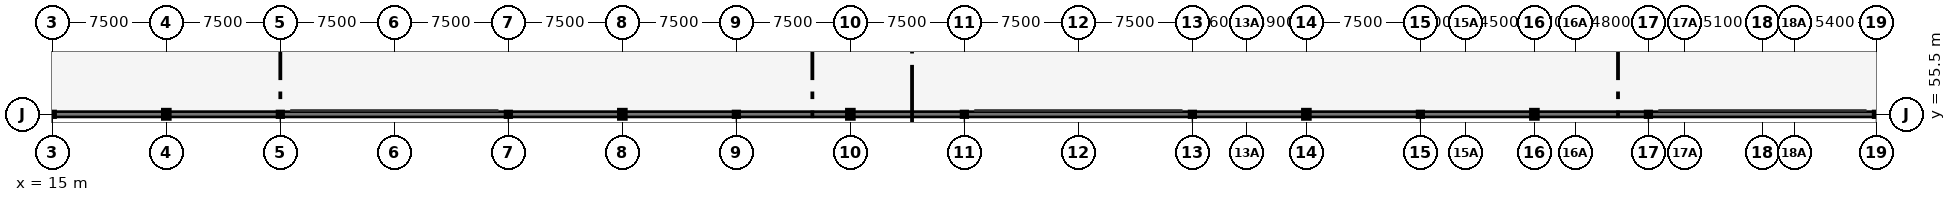
"""IFC4 building model, lengths in metres.
Left out: names, types, materials, properties, quantities, classifications, styles, units other than length and angle.
Written with IfcOpenShell. Run it as: python <this file> out.ifc"""

import sys

from ifc_helpers import new_model, si_unit, direction, frame, frame_2d, origin, origin_2d, place, context, subcontext, project, spatial, polyline, rectangle, i_section, outline, extrude, element, fill, save


model = new_model("IFC4")
c1 = context("Model", 3, precision=1e-05, world=origin(), true_north=direction((0.0, 1.0)))
c2 = subcontext(c1, "Body", "Model", "MODEL_VIEW")
j1 = project(units=[si_unit("LENGTHUNIT", "METRE"), si_unit("PLANEANGLEUNIT", "RADIAN")], contexts=[c1])
p1 = place(None, origin())
s1 = spatial("IfcSite", under=j1, at=p1, CompositionType="ELEMENT")
p2 = place(p1, origin())
s2 = spatial("IfcBuilding", under=s1, at=p2, CompositionType="ELEMENT")
p3 = place(p2, origin())
s3 = spatial("IfcBuildingStorey", under=s2, at=p3, CompositionType="ELEMENT", Elevation=0.0)
for number, where, z_axis, x_axis in (
    (1, (15.0, 55.5, 0.0), (0.0, 0.0, 1.0), (1.0, 0.0, 0.0)),
    (2, (30.0, 55.5, 0.0), (0.0, 0.0, 1.0), (1.0, 0.0, 0.0)),
    (3, (45.0, 55.5, 0.0), (0.0, 0.0, 1.0), (1.0, 0.0, 0.0)),
    (4, (60.0, 55.5, 0.0), (0.0, 0.0, 1.0), (1.0, 0.0, 0.0)),
    (5, (75.0, 55.5, 0.0), (0.0, 0.0, 1.0), (1.0, 0.0, 0.0)),
    (6, (90.0, 55.5, 0.0), (0.0, 0.0, 1.0), (1.0, 0.0, 0.0)),
    (7, (105.0, 55.5, 0.0), (0.0, 0.0, 1.0), (1.0, 0.0, 0.0)),
    (8, (120.0, 55.5, 0.0), (0.0, 0.0, 1.0), (1.0, 0.0, 0.0)),
    (9, (135.0, 55.5, 0.0), (0.0, 0.0, 1.0), (1.0, 0.0, 0.0)),
):
    element("IfcColumn", number, at=place(p3, frame(where, z_axis=z_axis, x_axis=x_axis)), inside=s3, PredefinedType="COLUMN", context=c2, shape_type="SweptSolid", body=[
        extrude(i_section(OverallWidth=0.256, OverallDepth=0.26, WebThickness=0.01, FlangeThickness=0.017, at=origin_2d()), origin(), (0.0, 0.0, 1.0), 7.6),
    ])
for number, where, z_axis, x_axis in (
    (10, (22.5, 55.5, 0.0), (0.0, 0.0, 1.0), (1.0, 0.0, 0.0)),
    (11, (52.5, 55.5, 0.0), (0.0, 0.0, 1.0), (1.0, 0.0, 0.0)),
    (12, (67.5, 55.5, 0.0), (0.0, 0.0, 1.0), (1.0, 0.0, 0.0)),
    (13, (97.5, 55.5, 0.0), (0.0, 0.0, 1.0), (1.0, 0.0, 0.0)),
    (14, (112.5, 55.5, 0.0), (0.0, 0.0, 1.0), (1.0, 0.0, 0.0)),
):
    element("IfcColumn", number, at=place(p3, frame(where, z_axis=z_axis, x_axis=x_axis)), inside=s3, PredefinedType="PILASTER", context=c2, shape_type="SweptSolid", body=[
        extrude(rectangle(XDim=0.35, YDim=0.5, at=origin_2d()), origin(), (0.0, 0.0, 1.0), 4.4),
    ])
p4 = place(p3, frame((7.5, 55.5, 0.0), z_axis=(0.0, 0.0, 1.0), x_axis=(1.0, 0.0, 0.0)))
e15 = element("IfcWall", 15, at=p4, inside=s3, PredefinedType="SOLIDWALL", context=c2, shape_type="SweptSolid", body=[
    extrude(rectangle(XDim=135.0, YDim=0.35, at=frame_2d((67.5, 0.0))), origin(), (0.0, 0.0, 1.0), 6.136),
])
p5 = place(p4, frame((3.2, 0.0, 3.4)))
e16 = element("IfcOpeningElement", 16, at=p5, cuts=e15, PredefinedType="OPENING", context=c2, shape_type="SweptSolid", body=[
    extrude(outline(polyline([(1.8, 0.9), (1.769, 1.133), (1.679, 1.35), (1.536, 1.536), (1.35, 1.679), (1.133, 1.769), (0.9, 1.8), (0.667, 1.769), (0.45, 1.679), (0.264, 1.536), (0.121, 1.35), (0.031, 1.133), (0.0, 0.9), (0.031, 0.667), (0.121, 0.45), (0.264, 0.264), (0.45, 0.121), (0.667, 0.031), (0.9, 0.0), (1.133, 0.031), (1.35, 0.121), (1.536, 0.264), (1.679, 0.45), (1.769, 0.667), (1.8, 0.9)])), frame((0.0, 0.185, 0.0), z_axis=(0.0, -1.0, 0.0), x_axis=(1.0, 0.0, 0.0)), (0.0, 0.0, 1.0), 0.37),
])
p6 = place(p4, frame((18.2, 0.0, 3.4)))
e17 = element("IfcOpeningElement", 17, at=p6, cuts=e15, PredefinedType="OPENING", context=c2, shape_type="SweptSolid", body=[
    extrude(outline(polyline([(2.1, 1.05), (2.064, 1.322), (1.959, 1.575), (1.792, 1.792), (1.575, 1.959), (1.322, 2.064), (1.05, 2.1), (0.778, 2.064), (0.525, 1.959), (0.308, 1.792), (0.141, 1.575), (0.036, 1.322), (0.0, 1.05), (0.036, 0.778), (0.141, 0.525), (0.308, 0.308), (0.525, 0.141), (0.778, 0.036), (1.05, 0.0), (1.322, 0.036), (1.575, 0.141), (1.792, 0.308), (1.959, 0.525), (2.064, 0.778), (2.1, 1.05)])), frame((0.0, 0.185, 0.0), z_axis=(0.0, -1.0, 0.0), x_axis=(1.0, 0.0, 0.0)), (0.0, 0.0, 1.0), 0.37),
])
p7 = place(p4, frame((33.2, 0.0, 3.4)))
e18 = element("IfcOpeningElement", 18, at=p7, cuts=e15, PredefinedType="OPENING", context=c2, shape_type="SweptSolid", body=[
    extrude(outline(polyline([(2.4, 1.2), (2.359, 1.51), (2.239, 1.8), (2.048, 2.048), (1.8, 2.239), (1.51, 2.359), (1.2, 2.4), (0.889, 2.359), (0.6, 2.239), (0.352, 2.048), (0.161, 1.8), (0.041, 1.51), (0.0, 1.2), (0.041, 0.889), (0.161, 0.6), (0.352, 0.352), (0.6, 0.161), (0.889, 0.041), (1.2, 0.0), (1.51, 0.041), (1.8, 0.161), (2.048, 0.352), (2.239, 0.6), (2.359, 0.889), (2.4, 1.2)])), frame((0.0, 0.185, 0.0), z_axis=(0.0, -1.0, 0.0), x_axis=(1.0, 0.0, 0.0)), (0.0, 0.0, 1.0), 0.37),
])
p8 = place(p4, frame((48.2, 0.0, 3.4)))
e19 = element("IfcOpeningElement", 19, at=p8, cuts=e15, PredefinedType="OPENING", context=c2, shape_type="SweptSolid", body=[
    extrude(outline(polyline([(1.8, 0.9), (1.769, 1.133), (1.679, 1.35), (1.536, 1.536), (1.35, 1.679), (1.133, 1.769), (0.9, 1.8), (0.667, 1.769), (0.45, 1.679), (0.264, 1.536), (0.121, 1.35), (0.031, 1.133), (0.0, 0.9), (0.031, 0.667), (0.121, 0.45), (0.264, 0.264), (0.45, 0.121), (0.667, 0.031), (0.9, 0.0), (1.133, 0.031), (1.35, 0.121), (1.536, 0.264), (1.679, 0.45), (1.769, 0.667), (1.8, 0.9)])), frame((0.0, 0.185, 0.0), z_axis=(0.0, -1.0, 0.0), x_axis=(1.0, 0.0, 0.0)), (0.0, 0.0, 1.0), 0.37),
])
p9 = place(p4, frame((63.2, 0.0, 3.4)))
e20 = element("IfcOpeningElement", 20, at=p9, cuts=e15, PredefinedType="OPENING", context=c2, shape_type="SweptSolid", body=[
    extrude(outline(polyline([(2.1, 1.05), (2.064, 1.322), (1.959, 1.575), (1.792, 1.792), (1.575, 1.959), (1.322, 2.064), (1.05, 2.1), (0.778, 2.064), (0.525, 1.959), (0.308, 1.792), (0.141, 1.575), (0.036, 1.322), (0.0, 1.05), (0.036, 0.778), (0.141, 0.525), (0.308, 0.308), (0.525, 0.141), (0.778, 0.036), (1.05, 0.0), (1.322, 0.036), (1.575, 0.141), (1.792, 0.308), (1.959, 0.525), (2.064, 0.778), (2.1, 1.05)])), frame((0.0, 0.185, 0.0), z_axis=(0.0, -1.0, 0.0), x_axis=(1.0, 0.0, 0.0)), (0.0, 0.0, 1.0), 0.37),
])
p10 = place(p4, frame((78.2, 0.0, 3.4)))
e21 = element("IfcOpeningElement", 21, at=p10, cuts=e15, PredefinedType="OPENING", context=c2, shape_type="SweptSolid", body=[
    extrude(outline(polyline([(2.4, 1.2), (2.359, 1.51), (2.239, 1.8), (2.048, 2.048), (1.8, 2.239), (1.51, 2.359), (1.2, 2.4), (0.889, 2.359), (0.6, 2.239), (0.352, 2.048), (0.161, 1.8), (0.041, 1.51), (0.0, 1.2), (0.041, 0.889), (0.161, 0.6), (0.352, 0.352), (0.6, 0.161), (0.889, 0.041), (1.2, 0.0), (1.51, 0.041), (1.8, 0.161), (2.048, 0.352), (2.239, 0.6), (2.359, 0.889), (2.4, 1.2)])), frame((0.0, 0.185, 0.0), z_axis=(0.0, -1.0, 0.0), x_axis=(1.0, 0.0, 0.0)), (0.0, 0.0, 1.0), 0.37),
])
p11 = place(p4, frame((93.2, 0.0, 3.4)))
e22 = element("IfcOpeningElement", 22, at=p11, cuts=e15, PredefinedType="OPENING", context=c2, shape_type="SweptSolid", body=[
    extrude(outline(polyline([(1.8, 0.9), (1.769, 1.133), (1.679, 1.35), (1.536, 1.536), (1.35, 1.679), (1.133, 1.769), (0.9, 1.8), (0.667, 1.769), (0.45, 1.679), (0.264, 1.536), (0.121, 1.35), (0.031, 1.133), (0.0, 0.9), (0.031, 0.667), (0.121, 0.45), (0.264, 0.264), (0.45, 0.121), (0.667, 0.031), (0.9, 0.0), (1.133, 0.031), (1.35, 0.121), (1.536, 0.264), (1.679, 0.45), (1.769, 0.667), (1.8, 0.9)])), frame((0.0, 0.185, 0.0), z_axis=(0.0, -1.0, 0.0), x_axis=(1.0, 0.0, 0.0)), (0.0, 0.0, 1.0), 0.37),
])
p12 = place(p4, frame((108.2, 0.0, 3.4)))
e23 = element("IfcOpeningElement", 23, at=p12, cuts=e15, PredefinedType="OPENING", context=c2, shape_type="SweptSolid", body=[
    extrude(outline(polyline([(2.1, 1.05), (2.064, 1.322), (1.959, 1.575), (1.792, 1.792), (1.575, 1.959), (1.322, 2.064), (1.05, 2.1), (0.778, 2.064), (0.525, 1.959), (0.308, 1.792), (0.141, 1.575), (0.036, 1.322), (0.0, 1.05), (0.036, 0.778), (0.141, 0.525), (0.308, 0.308), (0.525, 0.141), (0.778, 0.036), (1.05, 0.0), (1.322, 0.036), (1.575, 0.141), (1.792, 0.308), (1.959, 0.525), (2.064, 0.778), (2.1, 1.05)])), frame((0.0, 0.185, 0.0), z_axis=(0.0, -1.0, 0.0), x_axis=(1.0, 0.0, 0.0)), (0.0, 0.0, 1.0), 0.37),
])
p13 = place(p4, frame((123.2, 0.0, 3.4)))
e24 = element("IfcOpeningElement", 24, at=p13, cuts=e15, PredefinedType="OPENING", context=c2, shape_type="SweptSolid", body=[
    extrude(outline(polyline([(2.4, 1.2), (2.359, 1.51), (2.239, 1.8), (2.048, 2.048), (1.8, 2.239), (1.51, 2.359), (1.2, 2.4), (0.889, 2.359), (0.6, 2.239), (0.352, 2.048), (0.161, 1.8), (0.041, 1.51), (0.0, 1.2), (0.041, 0.889), (0.161, 0.6), (0.352, 0.352), (0.6, 0.161), (0.889, 0.041), (1.2, 0.0), (1.51, 0.041), (1.8, 0.161), (2.048, 0.352), (2.239, 0.6), (2.359, 0.889), (2.4, 1.2)])), frame((0.0, 0.185, 0.0), z_axis=(0.0, -1.0, 0.0), x_axis=(1.0, 0.0, 0.0)), (0.0, 0.0, 1.0), 0.37),
])
p14 = place(p4, frame((9.5, 0.0, 0.0)))
e25 = element("IfcOpeningElement", 25, at=p14, cuts=e15, PredefinedType="OPENING", context=c2, shape_type="SweptSolid", body=[
    extrude(rectangle(XDim=2.0, YDim=2.35, at=frame_2d((1.0, 1.175))), frame((0.0, 0.185, 0.0), z_axis=(0.0, -1.0, 0.0), x_axis=(1.0, 0.0, 0.0)), (0.0, 0.0, 1.0), 0.37),
])
p15 = place(p4, frame((24.5, 0.0, 0.0)))
e26 = element("IfcOpeningElement", 26, at=p15, cuts=e15, PredefinedType="OPENING", context=c2, shape_type="SweptSolid", body=[
    extrude(rectangle(XDim=2.0, YDim=2.35, at=frame_2d((1.0, 1.175))), frame((0.0, 0.185, 0.0), z_axis=(0.0, -1.0, 0.0), x_axis=(1.0, 0.0, 0.0)), (0.0, 0.0, 1.0), 0.37),
])
p16 = place(p4, frame((39.5, 0.0, 0.0)))
e27 = element("IfcOpeningElement", 27, at=p16, cuts=e15, PredefinedType="OPENING", context=c2, shape_type="SweptSolid", body=[
    extrude(rectangle(XDim=2.0, YDim=2.35, at=frame_2d((1.0, 1.175))), frame((0.0, 0.185, 0.0), z_axis=(0.0, -1.0, 0.0), x_axis=(1.0, 0.0, 0.0)), (0.0, 0.0, 1.0), 0.37),
])
p17 = place(p4, frame((54.5, 0.0, 0.0)))
e28 = element("IfcOpeningElement", 28, at=p17, cuts=e15, PredefinedType="OPENING", context=c2, shape_type="SweptSolid", body=[
    extrude(rectangle(XDim=2.0, YDim=2.35, at=frame_2d((1.0, 1.175))), frame((0.0, 0.185, 0.0), z_axis=(0.0, -1.0, 0.0), x_axis=(1.0, 0.0, 0.0)), (0.0, 0.0, 1.0), 0.37),
])
p18 = place(p4, frame((69.5, 0.0, 0.0)))
e29 = element("IfcOpeningElement", 29, at=p18, cuts=e15, PredefinedType="OPENING", context=c2, shape_type="SweptSolid", body=[
    extrude(rectangle(XDim=2.0, YDim=2.35, at=frame_2d((1.0, 1.175))), frame((0.0, 0.185, 0.0), z_axis=(0.0, -1.0, 0.0), x_axis=(1.0, 0.0, 0.0)), (0.0, 0.0, 1.0), 0.37),
])
p19 = place(p4, frame((129.5, 0.0, 0.0)))
e30 = element("IfcOpeningElement", 30, at=p19, cuts=e15, PredefinedType="OPENING", context=c2, shape_type="SweptSolid", body=[
    extrude(rectangle(XDim=2.0, YDim=2.35, at=frame_2d((1.0, 1.175))), frame((0.0, 0.185, 0.0), z_axis=(0.0, -1.0, 0.0), x_axis=(1.0, 0.0, 0.0)), (0.0, 0.0, 1.0), 0.37),
])
p20 = place(p6, origin())
e31 = element("IfcWindow", 31, at=p20, inside=s3, PartitioningType="SINGLE_PANEL", PredefinedType="WINDOW", context=c2, shape_type="SweptSolid", body=[
    extrude(outline(polyline([(2.1, 1.05), (2.064, 1.322), (1.959, 1.575), (1.792, 1.792), (1.575, 1.959), (1.322, 2.064), (1.05, 2.1), (0.778, 2.064), (0.525, 1.959), (0.308, 1.792), (0.141, 1.575), (0.036, 1.322), (0.0, 1.05), (0.036, 0.778), (0.141, 0.525), (0.308, 0.308), (0.525, 0.141), (0.778, 0.036), (1.05, 0.0), (1.322, 0.036), (1.575, 0.141), (1.792, 0.308), (1.959, 0.525), (2.064, 0.778), (2.1, 1.05)])), frame((0.0, 0.03, 0.0), z_axis=(0.0, -1.0, 0.0), x_axis=(1.0, 0.0, 0.0)), (0.0, 0.0, 1.0), 0.06),
])
fill(e17, e31)
p21 = place(p7, origin())
e32 = element("IfcWindow", 32, at=p21, inside=s3, PartitioningType="SINGLE_PANEL", PredefinedType="WINDOW", context=c2, shape_type="SweptSolid", body=[
    extrude(outline(polyline([(2.4, 1.2), (2.359, 1.51), (2.239, 1.8), (2.048, 2.048), (1.8, 2.239), (1.51, 2.359), (1.2, 2.4), (0.889, 2.359), (0.6, 2.239), (0.352, 2.048), (0.161, 1.8), (0.041, 1.51), (0.0, 1.2), (0.041, 0.889), (0.161, 0.6), (0.352, 0.352), (0.6, 0.161), (0.889, 0.041), (1.2, 0.0), (1.51, 0.041), (1.8, 0.161), (2.048, 0.352), (2.239, 0.6), (2.359, 0.889), (2.4, 1.2)])), frame((0.0, 0.03, 0.0), z_axis=(0.0, -1.0, 0.0), x_axis=(1.0, 0.0, 0.0)), (0.0, 0.0, 1.0), 0.06),
])
fill(e18, e32)
p22 = place(p8, origin())
e33 = element("IfcWindow", 33, at=p22, inside=s3, PartitioningType="SINGLE_PANEL", PredefinedType="WINDOW", context=c2, shape_type="SweptSolid", body=[
    extrude(outline(polyline([(1.8, 0.9), (1.769, 1.133), (1.679, 1.35), (1.536, 1.536), (1.35, 1.679), (1.133, 1.769), (0.9, 1.8), (0.667, 1.769), (0.45, 1.679), (0.264, 1.536), (0.121, 1.35), (0.031, 1.133), (0.0, 0.9), (0.031, 0.667), (0.121, 0.45), (0.264, 0.264), (0.45, 0.121), (0.667, 0.031), (0.9, 0.0), (1.133, 0.031), (1.35, 0.121), (1.536, 0.264), (1.679, 0.45), (1.769, 0.667), (1.8, 0.9)])), frame((0.0, 0.03, 0.0), z_axis=(0.0, -1.0, 0.0), x_axis=(1.0, 0.0, 0.0)), (0.0, 0.0, 1.0), 0.06),
])
fill(e19, e33)
p23 = place(p9, origin())
e34 = element("IfcWindow", 34, at=p23, inside=s3, PartitioningType="SINGLE_PANEL", PredefinedType="WINDOW", context=c2, shape_type="SweptSolid", body=[
    extrude(outline(polyline([(2.1, 1.05), (2.064, 1.322), (1.959, 1.575), (1.792, 1.792), (1.575, 1.959), (1.322, 2.064), (1.05, 2.1), (0.778, 2.064), (0.525, 1.959), (0.308, 1.792), (0.141, 1.575), (0.036, 1.322), (0.0, 1.05), (0.036, 0.778), (0.141, 0.525), (0.308, 0.308), (0.525, 0.141), (0.778, 0.036), (1.05, 0.0), (1.322, 0.036), (1.575, 0.141), (1.792, 0.308), (1.959, 0.525), (2.064, 0.778), (2.1, 1.05)])), frame((0.0, 0.03, 0.0), z_axis=(0.0, -1.0, 0.0), x_axis=(1.0, 0.0, 0.0)), (0.0, 0.0, 1.0), 0.06),
])
fill(e20, e34)
p24 = place(p10, origin())
e35 = element("IfcWindow", 35, at=p24, inside=s3, PartitioningType="SINGLE_PANEL", PredefinedType="WINDOW", context=c2, shape_type="SweptSolid", body=[
    extrude(outline(polyline([(2.4, 1.2), (2.359, 1.51), (2.239, 1.8), (2.048, 2.048), (1.8, 2.239), (1.51, 2.359), (1.2, 2.4), (0.889, 2.359), (0.6, 2.239), (0.352, 2.048), (0.161, 1.8), (0.041, 1.51), (0.0, 1.2), (0.041, 0.889), (0.161, 0.6), (0.352, 0.352), (0.6, 0.161), (0.889, 0.041), (1.2, 0.0), (1.51, 0.041), (1.8, 0.161), (2.048, 0.352), (2.239, 0.6), (2.359, 0.889), (2.4, 1.2)])), frame((0.0, 0.03, 0.0), z_axis=(0.0, -1.0, 0.0), x_axis=(1.0, 0.0, 0.0)), (0.0, 0.0, 1.0), 0.06),
])
fill(e21, e35)
p25 = place(p11, origin())
e36 = element("IfcWindow", 36, at=p25, inside=s3, PartitioningType="SINGLE_PANEL", PredefinedType="WINDOW", context=c2, shape_type="SweptSolid", body=[
    extrude(outline(polyline([(1.8, 0.9), (1.769, 1.133), (1.679, 1.35), (1.536, 1.536), (1.35, 1.679), (1.133, 1.769), (0.9, 1.8), (0.667, 1.769), (0.45, 1.679), (0.264, 1.536), (0.121, 1.35), (0.031, 1.133), (0.0, 0.9), (0.031, 0.667), (0.121, 0.45), (0.264, 0.264), (0.45, 0.121), (0.667, 0.031), (0.9, 0.0), (1.133, 0.031), (1.35, 0.121), (1.536, 0.264), (1.679, 0.45), (1.769, 0.667), (1.8, 0.9)])), frame((0.0, 0.03, 0.0), z_axis=(0.0, -1.0, 0.0), x_axis=(1.0, 0.0, 0.0)), (0.0, 0.0, 1.0), 0.06),
])
fill(e22, e36)
p26 = place(p12, origin())
e37 = element("IfcWindow", 37, at=p26, inside=s3, PartitioningType="SINGLE_PANEL", PredefinedType="WINDOW", context=c2, shape_type="SweptSolid", body=[
    extrude(outline(polyline([(2.1, 1.05), (2.064, 1.322), (1.959, 1.575), (1.792, 1.792), (1.575, 1.959), (1.322, 2.064), (1.05, 2.1), (0.778, 2.064), (0.525, 1.959), (0.308, 1.792), (0.141, 1.575), (0.036, 1.322), (0.0, 1.05), (0.036, 0.778), (0.141, 0.525), (0.308, 0.308), (0.525, 0.141), (0.778, 0.036), (1.05, 0.0), (1.322, 0.036), (1.575, 0.141), (1.792, 0.308), (1.959, 0.525), (2.064, 0.778), (2.1, 1.05)])), frame((0.0, 0.03, 0.0), z_axis=(0.0, -1.0, 0.0), x_axis=(1.0, 0.0, 0.0)), (0.0, 0.0, 1.0), 0.06),
])
fill(e23, e37)
p27 = place(p13, origin())
e38 = element("IfcWindow", 38, at=p27, inside=s3, PartitioningType="SINGLE_PANEL", PredefinedType="WINDOW", context=c2, shape_type="SweptSolid", body=[
    extrude(outline(polyline([(2.4, 1.2), (2.359, 1.51), (2.239, 1.8), (2.048, 2.048), (1.8, 2.239), (1.51, 2.359), (1.2, 2.4), (0.889, 2.359), (0.6, 2.239), (0.352, 2.048), (0.161, 1.8), (0.041, 1.51), (0.0, 1.2), (0.041, 0.889), (0.161, 0.6), (0.352, 0.352), (0.6, 0.161), (0.889, 0.041), (1.2, 0.0), (1.51, 0.041), (1.8, 0.161), (2.048, 0.352), (2.239, 0.6), (2.359, 0.889), (2.4, 1.2)])), frame((0.0, 0.03, 0.0), z_axis=(0.0, -1.0, 0.0), x_axis=(1.0, 0.0, 0.0)), (0.0, 0.0, 1.0), 0.06),
])
fill(e24, e38)
p28 = place(p14, frame((2.0, 0.0, 0.0), z_axis=(0.0, 0.0, 1.0), x_axis=(-1.0, 0.0, 0.0)))
e39 = element("IfcDoor", 39, at=p28, inside=s3, OperationType="DOUBLE_SWING_LEFT", PredefinedType="DOOR", context=c2, shape_type="SweptSolid", body=[
    extrude(rectangle(XDim=2.0, YDim=2.35, at=frame_2d((1.0, 1.175))), frame((0.0, 0.025, 0.0), z_axis=(0.0, -1.0, 0.0), x_axis=(1.0, 0.0, 0.0)), (0.0, 0.0, 1.0), 0.05),
])
fill(e25, e39)
p29 = place(p15, frame((2.0, 0.0, 0.0), z_axis=(0.0, 0.0, 1.0), x_axis=(-1.0, 0.0, 0.0)))
e40 = element("IfcDoor", 40, at=p29, inside=s3, OperationType="DOUBLE_SWING_LEFT", PredefinedType="DOOR", context=c2, shape_type="SweptSolid", body=[
    extrude(rectangle(XDim=2.0, YDim=2.35, at=frame_2d((1.0, 1.175))), frame((0.0, 0.025, 0.0), z_axis=(0.0, -1.0, 0.0), x_axis=(1.0, 0.0, 0.0)), (0.0, 0.0, 1.0), 0.05),
])
fill(e26, e40)
p30 = place(p16, frame((2.0, 0.0, 0.0), z_axis=(0.0, 0.0, 1.0), x_axis=(-1.0, 0.0, 0.0)))
e41 = element("IfcDoor", 41, at=p30, inside=s3, OperationType="DOUBLE_SWING_LEFT", PredefinedType="DOOR", context=c2, shape_type="SweptSolid", body=[
    extrude(rectangle(XDim=2.0, YDim=2.35, at=frame_2d((1.0, 1.175))), frame((0.0, 0.025, 0.0), z_axis=(0.0, -1.0, 0.0), x_axis=(1.0, 0.0, 0.0)), (0.0, 0.0, 1.0), 0.05),
])
fill(e27, e41)
p31 = place(p17, frame((2.0, 0.0, 0.0), z_axis=(0.0, 0.0, 1.0), x_axis=(-1.0, 0.0, 0.0)))
e42 = element("IfcDoor", 42, at=p31, inside=s3, OperationType="DOUBLE_SWING_LEFT", PredefinedType="DOOR", context=c2, shape_type="SweptSolid", body=[
    extrude(rectangle(XDim=2.0, YDim=2.35, at=frame_2d((1.0, 1.175))), frame((0.0, 0.025, 0.0), z_axis=(0.0, -1.0, 0.0), x_axis=(1.0, 0.0, 0.0)), (0.0, 0.0, 1.0), 0.05),
])
fill(e28, e42)
p32 = place(p18, frame((2.0, 0.0, 0.0), z_axis=(0.0, 0.0, 1.0), x_axis=(-1.0, 0.0, 0.0)))
e43 = element("IfcDoor", 43, at=p32, inside=s3, OperationType="DOUBLE_SWING_LEFT", PredefinedType="DOOR", context=c2, shape_type="SweptSolid", body=[
    extrude(rectangle(XDim=2.0, YDim=2.35, at=frame_2d((1.0, 1.175))), frame((0.0, 0.025, 0.0), z_axis=(0.0, -1.0, 0.0), x_axis=(1.0, 0.0, 0.0)), (0.0, 0.0, 1.0), 0.05),
])
fill(e29, e43)
save(model, sys.argv[1])
